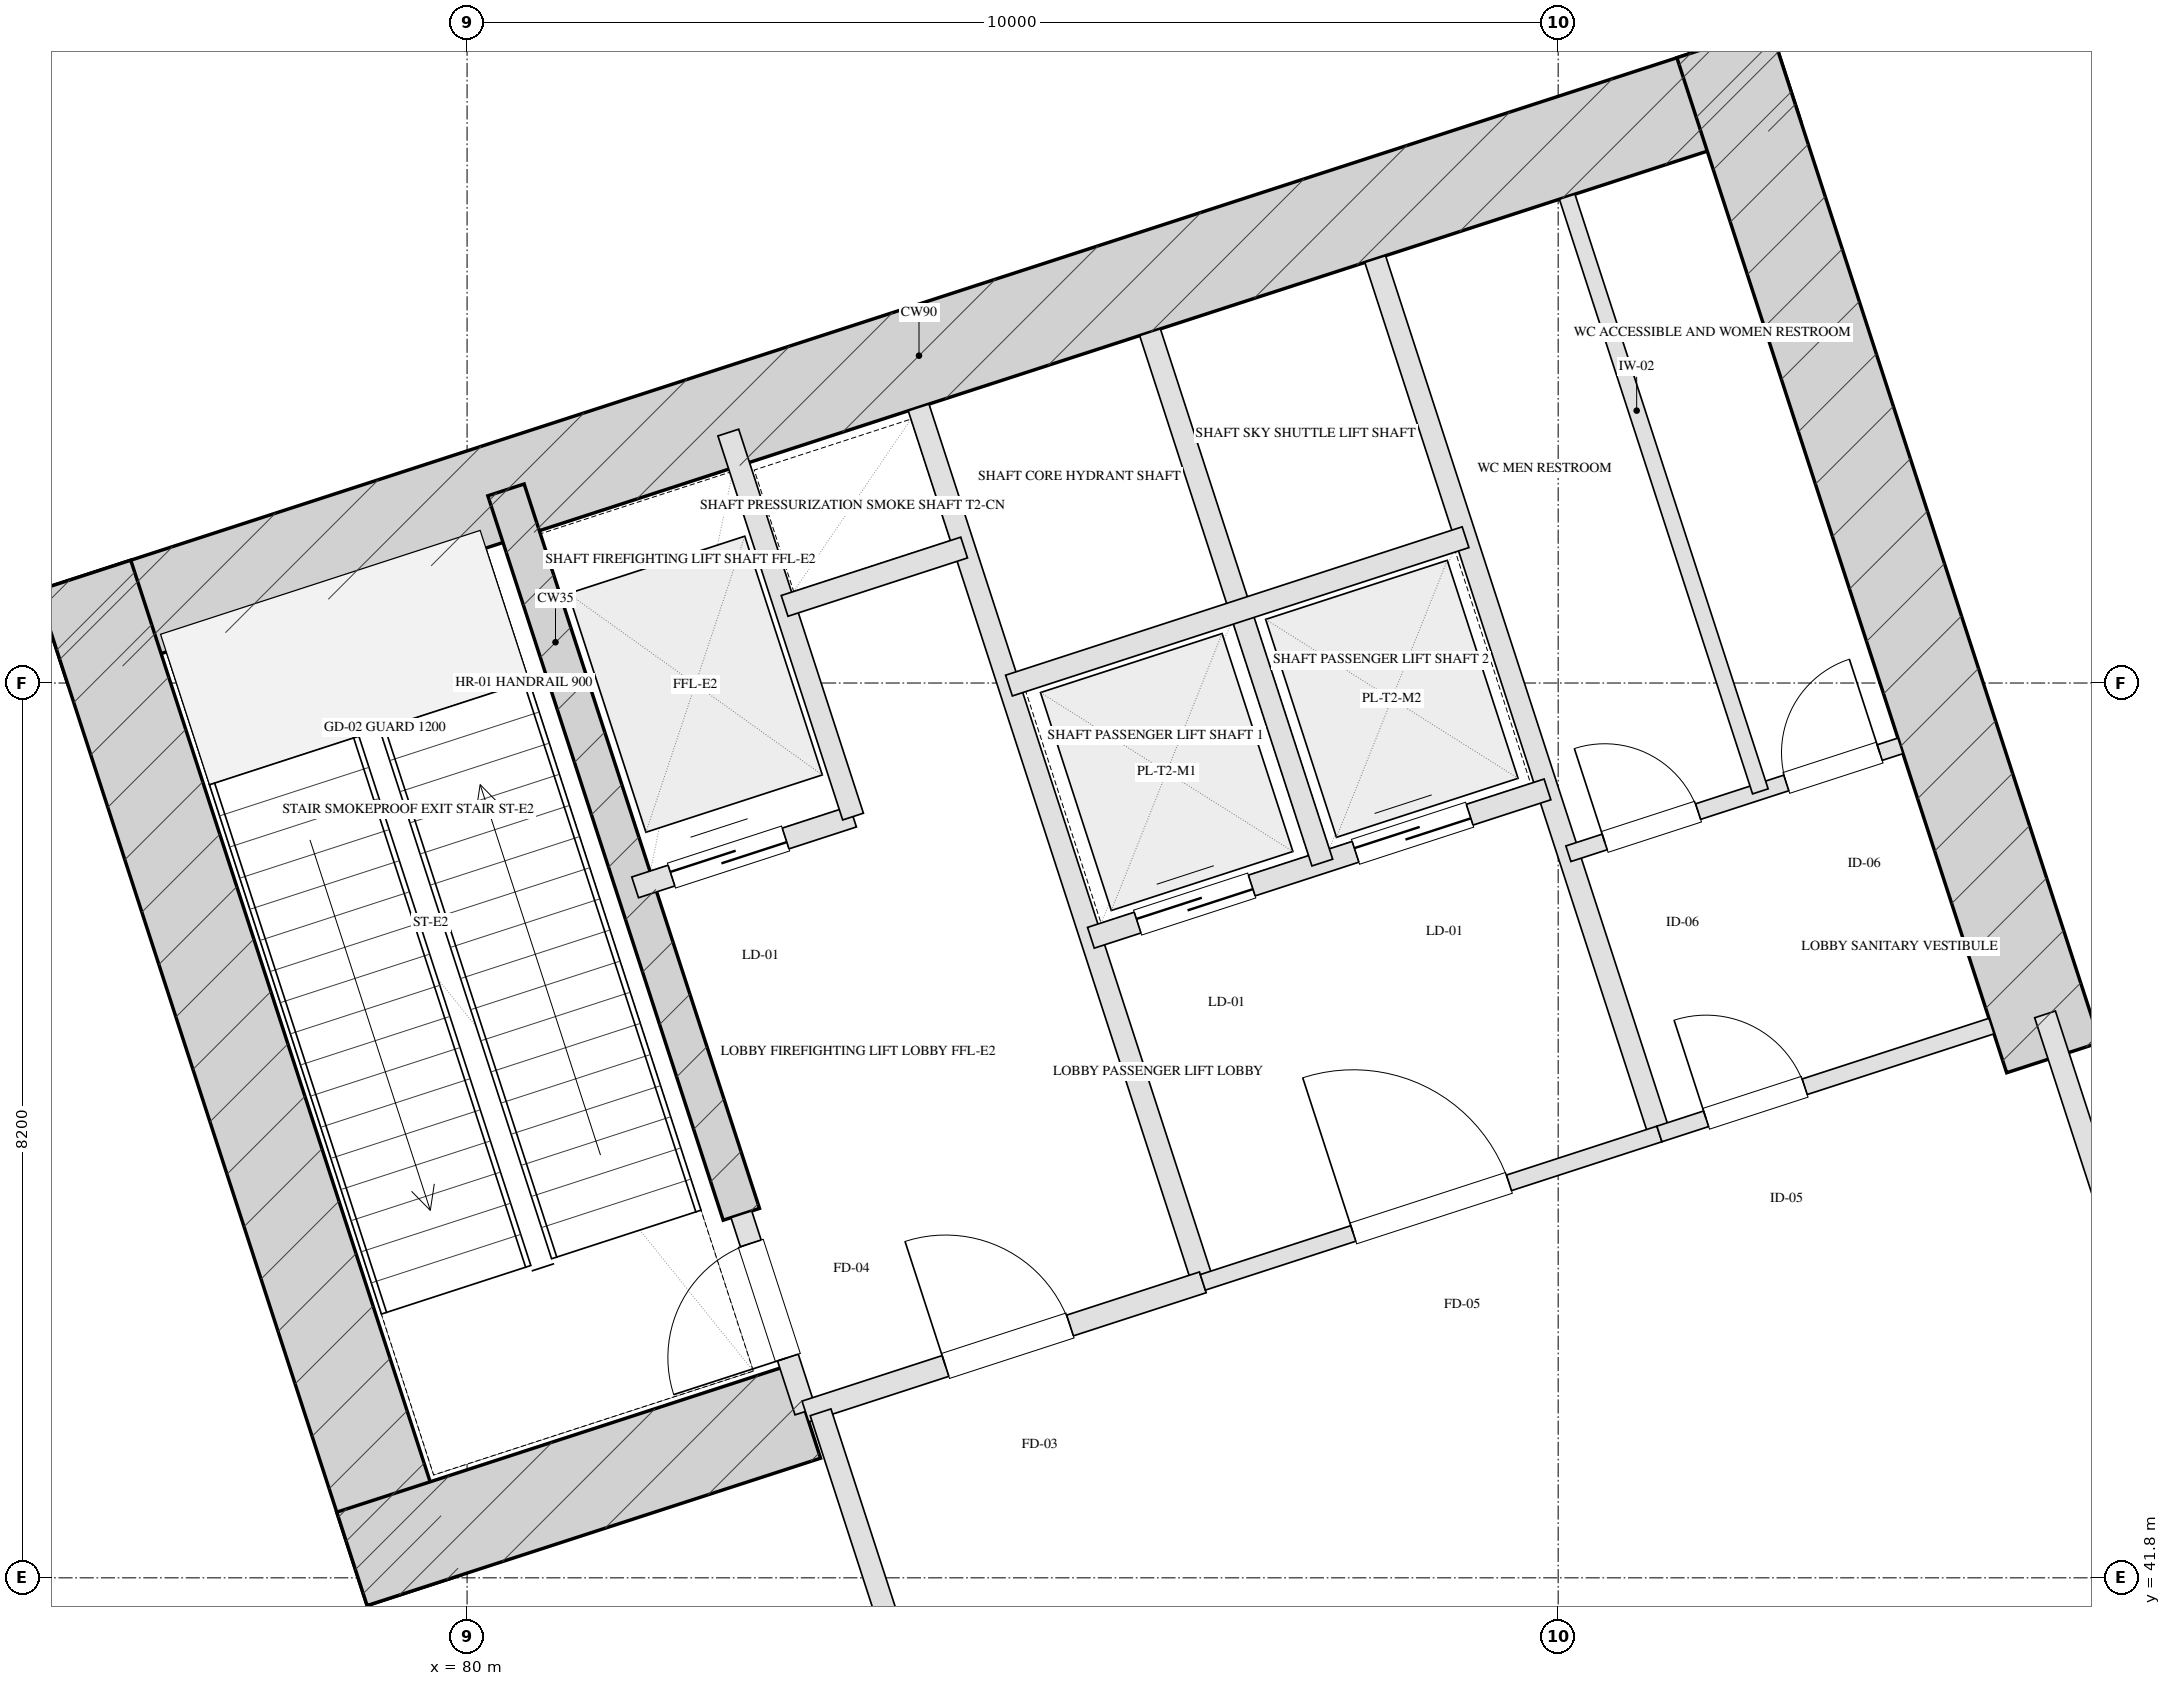
"""IFC4 building model, lengths in metres.
Left out: names, types, materials, properties, quantities, classifications, styles, units other than length and angle.
Written with IfcOpenShell. Run it as: python <this file> out.ifc"""

import sys

from ifc_helpers import new_model, si_unit, direction, frame, frame_2d, origin, place, context, subcontext, project, spatial, rectangle, extrude, element, fill, save


model = new_model("IFC4")
c1 = context("Model", 3, precision=1e-05, world=origin(), true_north=direction((0.0, 1.0)))
c2 = subcontext(c1, "Body", "Model", "MODEL_VIEW")
j1 = project(units=[si_unit("LENGTHUNIT", "METRE"), si_unit("PLANEANGLEUNIT", "RADIAN")], contexts=[c1])
p1 = place(None, origin())
s1 = spatial("IfcSite", under=j1, at=p1, CompositionType="ELEMENT")
p2 = place(p1, origin())
s2 = spatial("IfcBuilding", under=s1, at=p2, CompositionType="ELEMENT")
p3 = place(p2, origin())
s3 = spatial("IfcBuildingStorey", under=s2, at=p3, CompositionType="ELEMENT", Elevation=0.0)
p4 = place(p3, frame((76.201, 50.419, 0.0), z_axis=(0.0, 0.0, 1.0), x_axis=(0.951056412142, 0.309017314926, 0.0)))
e1 = element("IfcWall", 1, at=p4, inside=s3, PredefinedType="SHEAR", context=c2, shape_type="SweptSolid", body=[
    extrude(rectangle(XDim=16.7, YDim=0.9, at=frame_2d((8.35, 0.0))), origin(), (0.0, 0.0, 1.0), 6.0),
])
for number, where, z_axis, x_axis in (
    (2, (79.512, 41.685, 0.0), (0.0, 0.0, 1.0), (-0.309, 0.951, 0.0)),
    (3, (94.539, 46.568, 0.0), (0.0, 0.0, 1.0), (-0.309, 0.951, 0.0)),
):
    element("IfcWall", number, at=place(p3, frame(where, z_axis=z_axis, x_axis=x_axis)), inside=s3, PredefinedType="SHEAR", context=c2, shape_type="SweptSolid", body=[
        extrude(rectangle(XDim=9.78, YDim=0.9, at=frame_2d((4.89, 0.0))), origin(), (0.0, 0.0, 1.0), 6.0),
    ])
p5 = place(p3, frame((82.514, 45.131, 0.0), z_axis=(0.0, 0.0, 1.0), x_axis=(-0.308988790936, 0.951065679686, 0.0)))
e4 = element("IfcWall", 4, at=p5, inside=s3, PredefinedType="SHEAR", context=c2, shape_type="SweptSolid", body=[
    extrude(rectangle(XDim=6.98, YDim=0.35, at=frame_2d((3.49, 0.0))), origin(), (0.0, 0.0, 1.0), 6.0),
])
p6 = place(p3, frame((78.945, 41.974, 0.0), z_axis=(0.0, 0.0, 1.0), x_axis=(0.951058289404, 0.309011537255, 0.0)))
e5 = element("IfcWall", 5, at=p6, inside=s3, PredefinedType="SHEAR", context=c2, shape_type="SweptSolid", body=[
    extrude(rectangle(XDim=4.37, YDim=0.9, at=frame_2d((2.185, 0.0))), origin(), (0.0, 0.0, 1.0), 6.0),
])
p7 = place(p3, frame((83.101, 43.324, 0.0), z_axis=(0.0, 0.0, 1.0), x_axis=(-0.309048298632, 0.951046344356, 0.0)))
e6 = element("IfcWall", 6, at=p7, inside=s3, PredefinedType="PARTITIONING", context=c2, shape_type="SweptSolid", body=[
    extrude(rectangle(XDim=1.9, YDim=0.2, at=frame_2d((0.95, 0.0))), origin(), (0.0, 0.0, 1.0), 5.685),
])
p8 = place(p7, frame((0.52, 0.0, 0.0)))
e7 = element("IfcOpeningElement", 7, at=p8, cuts=e6, PredefinedType="OPENING", context=c2, shape_type="SweptSolid", body=[
    extrude(rectangle(XDim=1.1, YDim=2.05, at=frame_2d((0.55, 1.025))), frame((0.0, 0.11, 0.0), z_axis=(0.0, -1.0, 0.0), x_axis=(1.0, 0.0, 0.0)), (0.0, 0.0, 1.0), 0.22),
])
p9 = place(p3, frame((86.743, 44.508, 0.0), z_axis=(0.0, 0.0, 1.0), x_axis=(-0.309016001439, 0.951056838919, 0.0)))
e8 = element("IfcWall", 8, at=p9, inside=s3, PredefinedType="PARTITIONING", context=c2, shape_type="SweptSolid", body=[
    extrude(rectangle(XDim=8.43, YDim=0.2, at=frame_2d((4.215, 0.0))), origin(), (0.0, 0.0, 1.0), 5.685),
])
p10 = place(p3, frame((83.101, 43.324, 0.0), z_axis=(0.0, 0.0, 1.0), x_axis=(0.951052804469, 0.309028417967, 0.0)))
e9 = element("IfcWall", 9, at=p10, inside=s3, PredefinedType="PARTITIONING", context=c2, shape_type="SweptSolid", body=[
    extrude(rectangle(XDim=3.83, YDim=0.2, at=frame_2d((1.915, 0.0))), origin(), (0.0, 0.0, 1.0), 5.685),
])
p11 = place(p10, frame((1.35, 0.0, 0.0)))
e10 = element("IfcOpeningElement", 10, at=p11, cuts=e9, PredefinedType="OPENING", context=c2, shape_type="SweptSolid", body=[
    extrude(rectangle(XDim=1.2, YDim=2.05, at=frame_2d((0.6, 1.025))), frame((0.0, 0.11, 0.0), z_axis=(0.0, -1.0, 0.0), x_axis=(1.0, 0.0, 0.0)), (0.0, 0.0, 1.0), 0.22),
])
p12 = place(p3, frame((81.54, 48.127, 0.0), z_axis=(0.0, 0.0, 1.0), x_axis=(0.951062257173, 0.308999325213, 0.0)))
e11 = element("IfcWall", 11, at=p12, inside=s3, PredefinedType="PARTITIONING", context=c2, shape_type="SweptSolid", body=[
    extrude(rectangle(XDim=2.1, YDim=0.2, at=frame_2d((1.05, 0.0))), origin(), (0.0, 0.0, 1.0), 5.685),
])
p13 = place(p12, frame((0.35, 0.0, 0.0)))
e12 = element("IfcOpeningElement", 12, at=p13, cuts=e11, PredefinedType="OPENING", context=c2, shape_type="SweptSolid", body=[
    extrude(rectangle(XDim=1.1, YDim=2.05, at=frame_2d((0.55, 1.025))), frame((0.0, 0.11, 0.0), z_axis=(0.0, -1.0, 0.0), x_axis=(1.0, 0.0, 0.0)), (0.0, 0.0, 1.0), 0.22),
])
p14 = place(p3, frame((83.538, 48.776, 0.0), z_axis=(0.0, 0.0, 1.0), x_axis=(-0.3089935693, 0.951064127245, 0.0)))
e13 = element("IfcWall", 13, at=p14, inside=s3, PredefinedType="PARTITIONING", context=c2, shape_type="SweptSolid", body=[
    extrude(rectangle(XDim=3.7, YDim=0.2, at=frame_2d((1.85, 0.0))), origin(), (0.0, 0.0, 1.0), 5.685),
])
p15 = place(p3, frame((82.91, 50.707, 0.0), z_axis=(0.0, 0.0, 1.0), x_axis=(0.951041328149, 0.309063734775, 0.0)))
e14 = element("IfcWall", 14, at=p15, inside=s3, PredefinedType="PARTITIONING", context=c2, shape_type="SweptSolid", body=[
    extrude(rectangle(XDim=1.73, YDim=0.2, at=frame_2d((0.865, 0.0))), origin(), (0.0, 0.0, 1.0), 5.685),
])
p16 = place(p3, frame((90.928, 45.868, 0.0), z_axis=(0.0, 0.0, 1.0), x_axis=(-0.309042196757, 0.951048327176, 0.0)))
e15 = element("IfcWall", 15, at=p16, inside=s3, PredefinedType="PARTITIONING", context=c2, shape_type="SweptSolid", body=[
    extrude(rectangle(XDim=8.43, YDim=0.2, at=frame_2d((4.215, 0.0))), origin(), (0.0, 0.0, 1.0), 5.685),
])
p17 = place(p3, frame((86.743, 44.508, 0.0), z_axis=(0.0, 0.0, 1.0), x_axis=(0.951063829732, 0.308994485023, 0.0)))
e16 = element("IfcWall", 16, at=p17, inside=s3, PredefinedType="PARTITIONING", context=c2, shape_type="SweptSolid", body=[
    extrude(rectangle(XDim=4.4, YDim=0.15, at=frame_2d((2.2, 0.0))), origin(), (0.0, 0.0, 1.0), 5.685),
])
p18 = place(p17, frame((1.45, 0.0, 0.0)))
e17 = element("IfcOpeningElement", 17, at=p18, cuts=e16, PredefinedType="OPENING", context=c2, shape_type="SweptSolid", body=[
    extrude(rectangle(XDim=1.5, YDim=2.05, at=frame_2d((0.75, 1.025))), frame((0.0, 0.085, 0.0), z_axis=(0.0, -1.0, 0.0), x_axis=(1.0, 0.0, 0.0)), (0.0, 0.0, 1.0), 0.17),
])
p19 = place(p3, frame((85.718, 47.666, 0.0), z_axis=(0.0, 0.0, 1.0), x_axis=(0.951058531764, 0.30901079133, 0.0)))
e18 = element("IfcWall", 18, at=p19, inside=s3, PredefinedType="PARTITIONING", context=c2, shape_type="SweptSolid", body=[
    extrude(rectangle(XDim=4.4, YDim=0.2, at=frame_2d((2.2, 0.0))), origin(), (0.0, 0.0, 1.0), 5.685),
])
p20 = place(p19, frame((0.45, 0.0, 0.0)))
e19 = element("IfcOpeningElement", 19, at=p20, cuts=e18, PredefinedType="OPENING", context=c2, shape_type="SweptSolid", body=[
    extrude(rectangle(XDim=1.1, YDim=2.05, at=frame_2d((0.55, 1.025))), frame((0.0, 0.11, 0.0), z_axis=(0.0, -1.0, 0.0), x_axis=(1.0, 0.0, 0.0)), (0.0, 0.0, 1.0), 0.22),
])
p21 = place(p19, frame((2.55, 0.0, 0.0)))
e20 = element("IfcOpeningElement", 20, at=p21, cuts=e18, PredefinedType="OPENING", context=c2, shape_type="SweptSolid", body=[
    extrude(rectangle(XDim=1.1, YDim=2.05, at=frame_2d((0.55, 1.025))), frame((0.0, 0.11, 0.0), z_axis=(0.0, -1.0, 0.0), x_axis=(1.0, 0.0, 0.0)), (0.0, 0.0, 1.0), 0.22),
])
p22 = place(p3, frame((87.838, 48.354, 0.0), z_axis=(0.0, 0.0, 1.0), x_axis=(-0.3090093719, 0.951058992953, 0.0)))
e21 = element("IfcWall", 21, at=p22, inside=s3, PredefinedType="PARTITIONING", context=c2, shape_type="SweptSolid", body=[
    extrude(rectangle(XDim=5.11, YDim=0.2, at=frame_2d((2.555, 0.0))), origin(), (0.0, 0.0, 1.0), 5.685),
])
p23 = place(p3, frame((84.967, 49.977, 0.0), z_axis=(0.0, 0.0, 1.0), x_axis=(0.951063829732, 0.308994485023, 0.0)))
e22 = element("IfcWall", 22, at=p23, inside=s3, PredefinedType="PARTITIONING", context=c2, shape_type="SweptSolid", body=[
    extrude(rectangle(XDim=4.4, YDim=0.2, at=frame_2d((2.2, 0.0))), origin(), (0.0, 0.0, 1.0), 5.685),
])
p24 = place(p3, frame((90.928, 45.868, 0.0), z_axis=(0.0, 0.0, 1.0), x_axis=(0.951059297078, 0.309008435874, 0.0)))
e23 = element("IfcWall", 23, at=p24, inside=s3, PredefinedType="PARTITIONING", context=c2, shape_type="SweptSolid", body=[
    extrude(rectangle(XDim=3.2, YDim=0.15, at=frame_2d((1.6, 0.0))), origin(), (0.0, 0.0, 1.0), 5.685),
])
p25 = place(p24, frame((0.45, 0.0, 0.0)))
e24 = element("IfcOpeningElement", 24, at=p25, cuts=e23, PredefinedType="OPENING", context=c2, shape_type="SweptSolid", body=[
    extrude(rectangle(XDim=0.95, YDim=2.05, at=frame_2d((0.475, 1.025))), frame((0.0, 0.085, 0.0), z_axis=(0.0, -1.0, 0.0), x_axis=(1.0, 0.0, 0.0)), (0.0, 0.0, 1.0), 0.17),
])
p26 = place(p3, frame((90.094, 48.436, 0.0), z_axis=(0.0, 0.0, 1.0), x_axis=(0.951066581729, 0.308986014439, 0.0)))
e25 = element("IfcWall", 25, at=p26, inside=s3, PredefinedType="PARTITIONING", context=c2, shape_type="SweptSolid", body=[
    extrude(rectangle(XDim=3.2, YDim=0.15, at=frame_2d((1.6, 0.0))), origin(), (0.0, 0.0, 1.0), 5.685),
])
p27 = place(p26, frame((0.35, 0.0, 0.0)))
e26 = element("IfcOpeningElement", 26, at=p27, cuts=e25, PredefinedType="OPENING", context=c2, shape_type="SweptSolid", body=[
    extrude(rectangle(XDim=0.9, YDim=2.05, at=frame_2d((0.45, 1.025))), frame((0.0, 0.085, 0.0), z_axis=(0.0, -1.0, 0.0), x_axis=(1.0, 0.0, 0.0)), (0.0, 0.0, 1.0), 0.17),
])
p28 = place(p26, frame((2.1, 0.0, 0.0)))
e27 = element("IfcOpeningElement", 27, at=p28, cuts=e25, PredefinedType="OPENING", context=c2, shape_type="SweptSolid", body=[
    extrude(rectangle(XDim=0.9, YDim=2.05, at=frame_2d((0.45, 1.025))), frame((0.0, 0.085, 0.0), z_axis=(0.0, -1.0, 0.0), x_axis=(1.0, 0.0, 0.0)), (0.0, 0.0, 1.0), 0.17),
])
p29 = place(p3, frame((91.853, 49.007, 0.0), z_axis=(0.0, 0.0, 1.0), x_axis=(-0.309022487551, 0.951054731437, 0.0)))
e28 = element("IfcWall", 28, at=p29, inside=s3, PredefinedType="PARTITIONING", context=c2, shape_type="SweptSolid", body=[
    extrude(rectangle(XDim=5.73, YDim=0.15, at=frame_2d((2.865, 0.0))), origin(), (0.0, 0.0, 1.0), 5.685),
])
p30 = place(p3, frame((86.238, 34.092, 0.0), z_axis=(0.0, 0.0, 1.0), x_axis=(-0.309022900594, 0.951054597228, 0.0)))
e29 = element("IfcWall", 29, at=p30, inside=s3, PredefinedType="PARTITIONING", context=c2, shape_type="SweptSolid", body=[
    extrude(rectangle(XDim=9.7, YDim=0.2, at=frame_2d((4.85, 0.0))), origin(), (0.0, 0.0, 1.0), 5.685),
])
p31 = place(p3, frame((94.462, 46.963, 0.0), z_axis=(0.0, 0.0, 1.0), x_axis=(0.309032467762, -0.951051488548, 0.0)))
e30 = element("IfcWall", 30, at=p31, inside=s3, PredefinedType="PARTITIONING", context=c2, shape_type="SweptSolid", body=[
    extrude(rectangle(XDim=6.9, YDim=0.2, at=frame_2d((3.45, 0.0))), origin(), (0.0, 0.0, 1.0), 5.685),
])
p32 = place(p8, origin())
e31 = element("IfcDoor", 31, at=p32, inside=s3, OperationType="SINGLE_SWING_LEFT", PredefinedType="DOOR", context=c2, shape_type="SweptSolid", body=[
    extrude(rectangle(XDim=1.1, YDim=2.05, at=frame_2d((0.55, 1.025))), frame((0.0, 0.025, 0.0), z_axis=(0.0, -1.0, 0.0), x_axis=(1.0, 0.0, 0.0)), (0.0, 0.0, 1.0), 0.05),
])
fill(e7, e31)
p33 = place(p11, origin())
e32 = element("IfcDoor", 32, at=p33, inside=s3, OperationType="SINGLE_SWING_LEFT", PredefinedType="DOOR", context=c2, shape_type="SweptSolid", body=[
    extrude(rectangle(XDim=1.2, YDim=2.05, at=frame_2d((0.6, 1.025))), frame((0.0, 0.025, 0.0), z_axis=(0.0, -1.0, 0.0), x_axis=(1.0, 0.0, 0.0)), (0.0, 0.0, 1.0), 0.05),
])
fill(e10, e32)
p34 = place(p13, origin())
e33 = element("IfcDoor", 33, at=p34, inside=s3, OperationType="DOUBLE_DOOR_SLIDING", PredefinedType="DOOR", context=c2, shape_type="SweptSolid", body=[
    extrude(rectangle(XDim=1.1, YDim=2.05, at=frame_2d((0.55, 1.025))), frame((0.0, 0.025, 0.0), z_axis=(0.0, -1.0, 0.0), x_axis=(1.0, 0.0, 0.0)), (0.0, 0.0, 1.0), 0.05),
])
fill(e12, e33)
p35 = place(p18, origin())
e34 = element("IfcDoor", 34, at=p35, inside=s3, OperationType="SINGLE_SWING_LEFT", PredefinedType="DOOR", context=c2, shape_type="SweptSolid", body=[
    extrude(rectangle(XDim=1.5, YDim=2.05, at=frame_2d((0.75, 1.025))), frame((0.0, 0.025, 0.0), z_axis=(0.0, -1.0, 0.0), x_axis=(1.0, 0.0, 0.0)), (0.0, 0.0, 1.0), 0.05),
])
fill(e17, e34)
p36 = place(p20, origin())
e35 = element("IfcDoor", 35, at=p36, inside=s3, OperationType="DOUBLE_DOOR_SLIDING", PredefinedType="DOOR", context=c2, shape_type="SweptSolid", body=[
    extrude(rectangle(XDim=1.1, YDim=2.05, at=frame_2d((0.55, 1.025))), frame((0.0, 0.025, 0.0), z_axis=(0.0, -1.0, 0.0), x_axis=(1.0, 0.0, 0.0)), (0.0, 0.0, 1.0), 0.05),
])
fill(e19, e35)
p37 = place(p21, origin())
e36 = element("IfcDoor", 36, at=p37, inside=s3, OperationType="DOUBLE_DOOR_SLIDING", PredefinedType="DOOR", context=c2, shape_type="SweptSolid", body=[
    extrude(rectangle(XDim=1.1, YDim=2.05, at=frame_2d((0.55, 1.025))), frame((0.0, 0.025, 0.0), z_axis=(0.0, -1.0, 0.0), x_axis=(1.0, 0.0, 0.0)), (0.0, 0.0, 1.0), 0.05),
])
fill(e20, e36)
p38 = place(p25, origin())
e37 = element("IfcDoor", 37, at=p38, inside=s3, OperationType="SINGLE_SWING_LEFT", PredefinedType="DOOR", context=c2, shape_type="SweptSolid", body=[
    extrude(rectangle(XDim=0.95, YDim=2.05, at=frame_2d((0.475, 1.025))), frame((0.0, 0.025, 0.0), z_axis=(0.0, -1.0, 0.0), x_axis=(1.0, 0.0, 0.0)), (0.0, 0.0, 1.0), 0.05),
])
fill(e24, e37)
p39 = place(p27, origin())
e38 = element("IfcDoor", 38, at=p39, inside=s3, OperationType="SINGLE_SWING_LEFT", PredefinedType="DOOR", context=c2, shape_type="SweptSolid", body=[
    extrude(rectangle(XDim=0.9, YDim=2.05, at=frame_2d((0.45, 1.025))), frame((0.0, 0.025, 0.0), z_axis=(0.0, -1.0, 0.0), x_axis=(1.0, 0.0, 0.0)), (0.0, 0.0, 1.0), 0.05),
])
fill(e26, e38)
p40 = place(p28, origin())
e39 = element("IfcDoor", 39, at=p40, inside=s3, OperationType="SINGLE_SWING_RIGHT", PredefinedType="DOOR", context=c2, shape_type="SweptSolid", body=[
    extrude(rectangle(XDim=0.9, YDim=2.05, at=frame_2d((0.45, 1.025))), frame((0.0, 0.025, 0.0), z_axis=(0.0, -1.0, 0.0), x_axis=(1.0, 0.0, 0.0)), (0.0, 0.0, 1.0), 0.05),
])
fill(e27, e39)
save(model, sys.argv[1])
